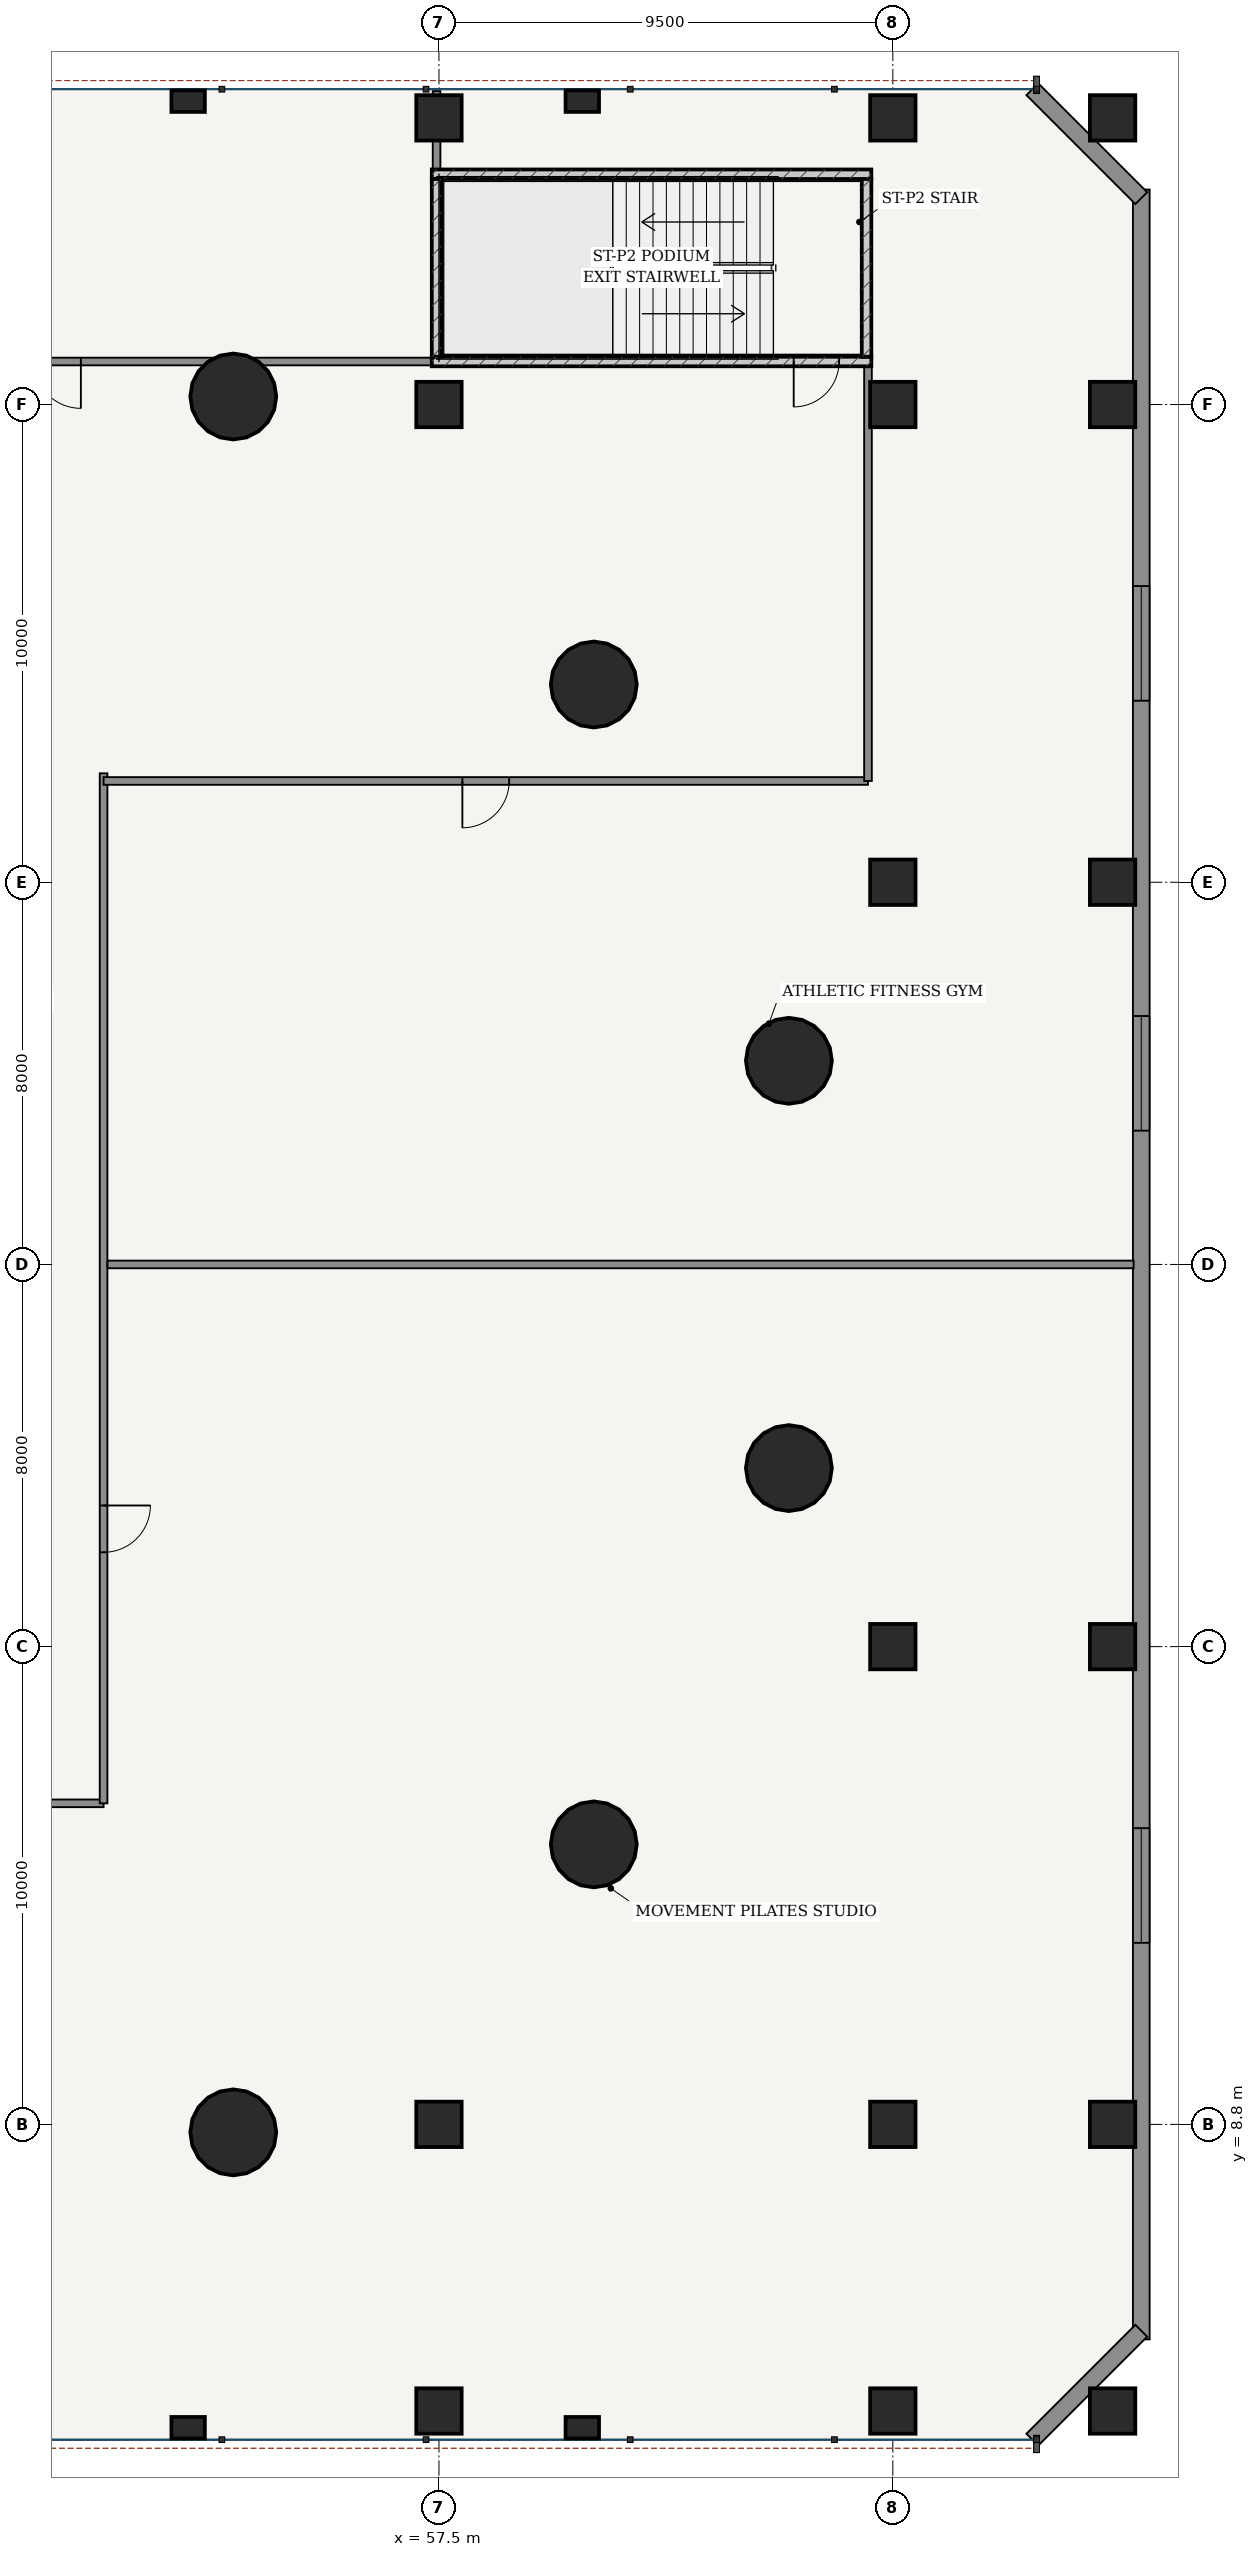
"""IFC4 building model, lengths in metres.
Left out: names, types, materials, properties, quantities, classifications, styles, units other than length and angle.
Written with IfcOpenShell. Run it as: python <this file> out.ifc"""

import sys

from ifc_helpers import new_model, si_unit, direction, frame, frame_2d, origin, origin_2d, place, context, subcontext, project, spatial, rectangle, hollow_circle, extrude, source, transform, mapped, element, fill, save


model = new_model("IFC4")
c1 = context("Model", 3, precision=1e-05, world=origin(), true_north=direction((-0.2419218956, 0.970295726276)))
c2 = subcontext(c1, "Body", "Model", "MODEL_VIEW")
j1 = project(units=[si_unit("LENGTHUNIT", "METRE"), si_unit("PLANEANGLEUNIT", "RADIAN")], contexts=[c1])
p1 = place(None, origin())
s1 = spatial("IfcSite", under=j1, at=p1, CompositionType="ELEMENT")
p2 = place(p1, origin())
s2 = spatial("IfcBuilding", under=s1, at=p2, CompositionType="ELEMENT")
p3 = place(p2, frame((0.0, 0.0, 14.4)))
s3 = spatial("IfcBuildingStorey", under=s2, at=p3, CompositionType="ELEMENT", Elevation=14.4)
p4 = place(p3, frame((57.35, 45.7, 0.0), z_axis=(0.0, 0.0, 1.0), x_axis=(1.0, 0.0, 0.0)))
e1 = element("IfcWall", 1, at=p4, inside=s3, PredefinedType="SOLIDWALL", context=c2, shape_type="SweptSolid", body=[
    extrude(rectangle(XDim=9.2, YDim=0.2, at=frame_2d((4.6, 0.0))), origin(), (0.0, 0.0, 1.0), 4.05),
])
p5 = place(p4, frame((7.575, 0.0, 0.0)))
e2 = element("IfcOpeningElement", 2, at=p5, cuts=e1, PredefinedType="OPENING", context=c2, shape_type="SweptSolid", body=[
    extrude(rectangle(XDim=0.95, YDim=2.15, at=frame_2d((0.475, 1.075))), frame((0.0, 0.11, 0.0), z_axis=(0.0, -1.0, 0.0), x_axis=(1.0, 0.0, 0.0)), (0.0, 0.0, 1.0), 0.22),
])
p6 = place(p3, frame((57.35, 49.62, 0.0), z_axis=(0.0, 0.0, 1.0), x_axis=(1.0, 0.0, 0.0)))
e3 = element("IfcWall", 3, at=p6, inside=s3, PredefinedType="SOLIDWALL", context=c2, shape_type="SweptSolid", body=[
    extrude(rectangle(XDim=9.2, YDim=0.2, at=frame_2d((4.6, 0.0))), origin(), (0.0, 0.0, 1.0), 4.05),
])
for number, where, z_axis, x_axis in (
    (4, (57.45, 45.8, 0.0), (0.0, 0.0, 1.0), (0.0, 1.0, 0.0)),
    (5, (66.45, 45.8, 0.0), (0.0, 0.0, 1.0), (0.0, 1.0, 0.0)),
):
    element("IfcWall", number, at=place(p3, frame(where, z_axis=z_axis, x_axis=x_axis)), inside=s3, PredefinedType="SOLIDWALL", context=c2, shape_type="SweptSolid", body=[
        extrude(rectangle(XDim=3.72, YDim=0.2, at=frame_2d((1.86, 0.0))), origin(), (0.0, 0.0, 1.0), 4.05),
    ])
for number, where, z_axis, x_axis in (
    (6, (64.824, 31.063, 0.0), (0.0, 0.0, 1.0), (1.0, 0.0, 0.0)),
    (7, (60.741, 38.939, 0.0), (0.0, 0.0, 1.0), (1.0, 0.0, 0.0)),
    (8, (53.195, 44.968, 0.0), (0.0, 0.0, 1.0), (1.0, 0.0, 0.0)),
    (9, (53.195, 8.632, 0.0), (0.0, 0.0, 1.0), (1.0, 0.0, 0.0)),
    (10, (60.741, 14.661, 0.0), (0.0, 0.0, 1.0), (1.0, 0.0, 0.0)),
    (11, (64.824, 22.537, 0.0), (0.0, 0.0, 1.0), (1.0, 0.0, 0.0)),
):
    element("IfcColumn", number, at=place(p3, frame(where, z_axis=z_axis, x_axis=x_axis)), inside=s3, PredefinedType="COLUMN", context=c2, shape_type="SweptSolid", body=[
        extrude(hollow_circle(Radius=0.9, WallThickness=0.055, at=origin_2d()), origin(), (0.0, 0.0, 1.0), 4.5),
    ])
for number, where, z_axis, x_axis in (
    (12, (57.5, 2.8, 0.0), (0.0, 0.0, 1.0), (1.0, 0.0, 0.0)),
    (13, (57.5, 8.8, 0.0), (0.0, 0.0, 1.0), (1.0, 0.0, 0.0)),
    (14, (57.5, 44.8, 0.0), (0.0, 0.0, 1.0), (1.0, 0.0, 0.0)),
    (15, (57.5, 50.8, 0.0), (0.0, 0.0, 1.0), (1.0, 0.0, 0.0)),
    (16, (67.0, 2.8, 0.0), (0.0, 0.0, 1.0), (1.0, 0.0, 0.0)),
    (17, (67.0, 8.8, 0.0), (0.0, 0.0, 1.0), (1.0, 0.0, 0.0)),
    (18, (67.0, 18.8, 0.0), (0.0, 0.0, 1.0), (1.0, 0.0, 0.0)),
    (19, (67.0, 34.8, 0.0), (0.0, 0.0, 1.0), (1.0, 0.0, 0.0)),
    (20, (67.0, 44.8, 0.0), (0.0, 0.0, 1.0), (1.0, 0.0, 0.0)),
    (21, (67.0, 50.8, 0.0), (0.0, 0.0, 1.0), (1.0, 0.0, 0.0)),
    (22, (71.6, 2.8, 0.0), (0.0, 0.0, 1.0), (1.0, 0.0, 0.0)),
    (23, (71.6, 8.8, 0.0), (0.0, 0.0, 1.0), (1.0, 0.0, 0.0)),
    (24, (71.6, 18.8, 0.0), (0.0, 0.0, 1.0), (1.0, 0.0, 0.0)),
    (25, (71.6, 34.8, 0.0), (0.0, 0.0, 1.0), (1.0, 0.0, 0.0)),
    (26, (71.6, 44.8, 0.0), (0.0, 0.0, 1.0), (1.0, 0.0, 0.0)),
    (27, (71.6, 50.8, 0.0), (0.0, 0.0, 1.0), (1.0, 0.0, 0.0)),
):
    element("IfcColumn", number, at=place(p3, frame(where, z_axis=z_axis, x_axis=x_axis)), inside=s3, PredefinedType="COLUMN", context=c2, shape_type="SweptSolid", body=[
        extrude(rectangle(XDim=0.95, YDim=0.95, at=origin_2d()), origin(), (0.0, 0.0, 1.0), 4.5),
    ])
for number, where, z_axis, x_axis in (
    (28, (52.25, 2.45, 0.0), (0.0, 0.0, 1.0), (1.0, 0.0, 0.0)),
    (29, (52.25, 51.15, 0.0), (0.0, 0.0, 1.0), (1.0, 0.0, 0.0)),
    (30, (60.5, 2.45, 0.0), (0.0, 0.0, 1.0), (1.0, 0.0, 0.0)),
    (31, (60.5, 51.15, 0.0), (0.0, 0.0, 1.0), (1.0, 0.0, 0.0)),
):
    element("IfcColumn", number, at=place(p3, frame(where, z_axis=z_axis, x_axis=x_axis)), inside=s3, PredefinedType="PILASTER", context=c2, shape_type="SweptSolid", body=[
        extrude(rectangle(XDim=0.7, YDim=0.45, at=origin_2d()), origin(), (0.0, 0.0, 1.0), 4.5),
    ])
p7 = place(p3, frame((72.2, 4.3, 0.0), z_axis=(0.0, 0.0, 1.0), x_axis=(0.0, 1.0, 0.0)))
e32 = element("IfcWall", 32, at=p7, inside=s3, PredefinedType="SOLIDWALL", context=c2, shape_type="SweptSolid", body=[
    extrude(rectangle(XDim=45.0, YDim=0.35, at=frame_2d((22.5, 0.0))), origin(), (0.0, 0.0, 1.0), 4.05),
])
p8 = place(p7, frame((8.3, 0.0, 0.85)))
e33 = element("IfcOpeningElement", 33, at=p8, cuts=e32, PredefinedType="OPENING", context=c2, shape_type="SweptSolid", body=[
    extrude(rectangle(XDim=2.4, YDim=2.2, at=frame_2d((1.2, 1.1))), frame((0.0, 0.185, 0.0), z_axis=(0.0, -1.0, 0.0), x_axis=(1.0, 0.0, 0.0)), (0.0, 0.0, 1.0), 0.37),
])
p9 = place(p7, frame((25.3, 0.0, 0.85)))
e34 = element("IfcOpeningElement", 34, at=p9, cuts=e32, PredefinedType="OPENING", context=c2, shape_type="SweptSolid", body=[
    extrude(rectangle(XDim=2.4, YDim=2.2, at=frame_2d((1.2, 1.1))), frame((0.0, 0.185, 0.0), z_axis=(0.0, -1.0, 0.0), x_axis=(1.0, 0.0, 0.0)), (0.0, 0.0, 1.0), 0.37),
])
p10 = place(p7, frame((34.3, 0.0, 0.85)))
e35 = element("IfcOpeningElement", 35, at=p10, cuts=e32, PredefinedType="OPENING", context=c2, shape_type="SweptSolid", body=[
    extrude(rectangle(XDim=2.4, YDim=2.2, at=frame_2d((1.2, 1.1))), frame((0.0, 0.185, 0.0), z_axis=(0.0, -1.0, 0.0), x_axis=(1.0, 0.0, 0.0)), (0.0, 0.0, 1.0), 0.37),
])
for number, where, z_axis, x_axis in (
    (36, (69.92, 2.2, 0.0), (0.0, 0.0, 1.0), (0.707, 0.707, 0.0)),
    (37, (72.2, 49.12, 0.0), (0.0, 0.0, 1.0), (-0.707, 0.707, 0.0)),
):
    element("IfcWall", number, at=place(p3, frame(where, z_axis=z_axis, x_axis=x_axis)), inside=s3, PredefinedType="SOLIDWALL", context=c2, shape_type="SweptSolid", body=[
        extrude(rectangle(XDim=3.224, YDim=0.35, at=frame_2d((1.612, 0.0))), origin(), (0.0, 0.0, 1.0), 3.085),
    ])
p11 = place(p3, frame((25.52, 15.52, 0.0), z_axis=(0.0, 0.0, 1.0), x_axis=(1.0, 0.0, 0.0)))
e38 = element("IfcWall", 38, at=p11, inside=s3, PredefinedType="PARTITIONING", context=c2, shape_type="SweptSolid", body=[
    extrude(rectangle(XDim=24.96, YDim=0.16, at=frame_2d((12.48, 0.0))), origin(), (0.0, 0.0, 1.0), 3.4),
])
p12 = place(p11, frame((5.854, 0.0, 0.0)))
e39 = element("IfcOpeningElement", 39, at=p12, cuts=e38, PredefinedType="OPENING", context=c2, shape_type="SweptSolid", body=[
    extrude(rectangle(XDim=0.98, YDim=2.2, at=frame_2d((0.49, 1.1))), frame((0.0, 0.09, 0.0), z_axis=(0.0, -1.0, 0.0), x_axis=(1.0, 0.0, 0.0)), (0.0, 0.0, 1.0), 0.18),
])
p13 = place(p11, frame((18.125, 0.0, 0.0)))
e40 = element("IfcOpeningElement", 40, at=p13, cuts=e38, PredefinedType="OPENING", context=c2, shape_type="SweptSolid", body=[
    extrude(rectangle(XDim=0.98, YDim=2.2, at=frame_2d((0.49, 1.1))), frame((0.0, 0.09, 0.0), z_axis=(0.0, -1.0, 0.0), x_axis=(1.0, 0.0, 0.0)), (0.0, 0.0, 1.0), 0.18),
])
p14 = place(p3, frame((50.48, 15.52, 0.0), z_axis=(0.0, 0.0, 1.0), x_axis=(0.0, 1.0, 0.0)))
e41 = element("IfcWall", 41, at=p14, inside=s3, PredefinedType="PARTITIONING", context=c2, shape_type="SweptSolid", body=[
    extrude(rectangle(XDim=21.56, YDim=0.16, at=frame_2d((10.78, 0.0))), origin(), (0.0, 0.0, 1.0), 3.4),
])
p15 = place(p14, frame((5.254, 0.0, 0.0)))
e42 = element("IfcOpeningElement", 42, at=p15, cuts=e41, PredefinedType="OPENING", context=c2, shape_type="SweptSolid", body=[
    extrude(rectangle(XDim=0.98, YDim=2.2, at=frame_2d((0.49, 1.1))), frame((0.0, 0.09, 0.0), z_axis=(0.0, -1.0, 0.0), x_axis=(1.0, 0.0, 0.0)), (0.0, 0.0, 1.0), 0.18),
])
p16 = place(p3, frame((50.48, 36.92, 0.0), z_axis=(0.0, 0.0, 1.0), x_axis=(1.0, 0.0, 0.0)))
e43 = element("IfcWall", 43, at=p16, inside=s3, PredefinedType="PARTITIONING", context=c2, shape_type="SweptSolid", body=[
    extrude(rectangle(XDim=16.0, YDim=0.16, at=frame_2d((8.0, 0.0))), origin(), (0.0, 0.0, 1.0), 3.4),
])
p17 = place(p16, frame((7.51, 0.0, 0.0)))
e44 = element("IfcOpeningElement", 44, at=p17, cuts=e43, PredefinedType="OPENING", context=c2, shape_type="SweptSolid", body=[
    extrude(rectangle(XDim=0.98, YDim=2.2, at=frame_2d((0.49, 1.1))), frame((0.0, 0.09, 0.0), z_axis=(0.0, -1.0, 0.0), x_axis=(1.0, 0.0, 0.0)), (0.0, 0.0, 1.0), 0.18),
])
p18 = place(p3, frame((66.48, 36.92, 0.0), z_axis=(0.0, 0.0, 1.0), x_axis=(0.0, 1.0, 0.0)))
e45 = element("IfcWall", 45, at=p18, inside=s3, PredefinedType="PARTITIONING", context=c2, shape_type="SweptSolid", body=[
    extrude(rectangle(XDim=8.78, YDim=0.16, at=frame_2d((4.39, 0.0))), origin(), (0.0, 0.0, 1.0), 2.435),
])
p19 = place(p3, frame((18.55, 45.7, 0.0), z_axis=(0.0, 0.0, 1.0), x_axis=(1.0, 0.0, 0.0)))
e46 = element("IfcWall", 46, at=p19, inside=s3, PredefinedType="PARTITIONING", context=c2, shape_type="SweptSolid", body=[
    extrude(rectangle(XDim=38.9, YDim=0.16, at=frame_2d((19.45, 0.0))), origin(), (0.0, 0.0, 1.0), 3.4),
])
p20 = place(p19, frame((7.505, 0.0, 0.0)))
e47 = element("IfcOpeningElement", 47, at=p20, cuts=e46, PredefinedType="OPENING", context=c2, shape_type="SweptSolid", body=[
    extrude(rectangle(XDim=0.86, YDim=2.1, at=frame_2d((0.43, 1.05))), frame((0.0, 0.09, 0.0), z_axis=(0.0, -1.0, 0.0), x_axis=(1.0, 0.0, 0.0)), (0.0, 0.0, 1.0), 0.18),
])
p21 = place(p19, frame((19.02, 0.0, 0.0)))
e48 = element("IfcOpeningElement", 48, at=p21, cuts=e46, PredefinedType="OPENING", context=c2, shape_type="SweptSolid", body=[
    extrude(rectangle(XDim=0.86, YDim=2.1, at=frame_2d((0.43, 1.05))), frame((0.0, 0.09, 0.0), z_axis=(0.0, -1.0, 0.0), x_axis=(1.0, 0.0, 0.0)), (0.0, 0.0, 1.0), 0.18),
])
p22 = place(p19, frame((30.475, 0.0, 0.0)))
e49 = element("IfcOpeningElement", 49, at=p22, cuts=e46, PredefinedType="OPENING", context=c2, shape_type="SweptSolid", body=[
    extrude(rectangle(XDim=0.98, YDim=2.2, at=frame_2d((0.49, 1.1))), frame((0.0, 0.09, 0.0), z_axis=(0.0, -1.0, 0.0), x_axis=(1.0, 0.0, 0.0)), (0.0, 0.0, 1.0), 0.18),
])
p23 = place(p3, frame((50.562, 26.8, 0.0), z_axis=(0.0, 0.0, 1.0), x_axis=(1.0, 0.0, 0.0)))
e50 = element("IfcWall", 50, at=p23, inside=s3, PredefinedType="PARTITIONING", context=c2, shape_type="SweptSolid", body=[
    extrude(rectangle(XDim=21.478, YDim=0.16, at=frame_2d((10.739, 0.0))), origin(), (0.0, 0.0, 1.0), 3.492),
])
p24 = place(p3, frame((57.45, 49.722, 0.0), z_axis=(0.0, 0.0, 1.0), x_axis=(0.0, 1.0, 0.0)))
e51 = element("IfcWall", 51, at=p24, inside=s3, PredefinedType="PARTITIONING", context=c2, shape_type="SweptSolid", body=[
    extrude(rectangle(XDim=1.638, YDim=0.16, at=frame_2d((0.819, 0.0))), origin(), (0.0, 0.0, 1.0), 3.085),
])
m1 = source(origin(), c2, "Body", "SweptSolid", [
    extrude(rectangle(XDim=2.4, YDim=2.2, at=frame_2d((1.2, 1.1))), frame((0.0, 0.03, 0.0), z_axis=(0.0, -1.0, 0.0), x_axis=(1.0, 0.0, 0.0)), (0.0, 0.0, 1.0), 0.06),
])
p25 = place(p8, origin())
e52 = element("IfcWindow", 52, at=p25, inside=s3, PartitioningType="SINGLE_PANEL", PredefinedType="WINDOW", context=c2, shape_type="MappedRepresentation", body=[
    mapped(m1, transform((0.0, 0.0, 0.0), scale=1.0)),
])
fill(e33, e52)
p26 = place(p9, origin())
e53 = element("IfcWindow", 53, at=p26, inside=s3, PartitioningType="SINGLE_PANEL", PredefinedType="WINDOW", context=c2, shape_type="MappedRepresentation", body=[
    mapped(m1, transform((0.0, 0.0, 0.0), scale=1.0)),
])
fill(e34, e53)
p27 = place(p10, origin())
e54 = element("IfcWindow", 54, at=p27, inside=s3, PartitioningType="SINGLE_PANEL", PredefinedType="WINDOW", context=c2, shape_type="MappedRepresentation", body=[
    mapped(m1, transform((0.0, 0.0, 0.0), scale=1.0)),
])
fill(e35, e54)
m2 = source(origin(), c2, "Body", "SweptSolid", [
    extrude(rectangle(XDim=0.95, YDim=2.15, at=frame_2d((0.475, 1.075))), frame((0.0, 0.025, 0.0), z_axis=(0.0, -1.0, 0.0), x_axis=(1.0, 0.0, 0.0)), (0.0, 0.0, 1.0), 0.05),
])
p28 = place(p5, frame((0.95, 0.0, 0.0), z_axis=(0.0, 0.0, 1.0), x_axis=(-1.0, 0.0, 0.0)))
e55 = element("IfcDoor", 55, at=p28, inside=s3, OperationType="SINGLE_SWING_RIGHT", PredefinedType="DOOR", context=c2, shape_type="MappedRepresentation", body=[
    mapped(m2, transform((0.0, 0.0, 0.0), scale=1.0)),
])
fill(e2, e55)
m3 = source(origin(), c2, "Body", "SweptSolid", [
    extrude(rectangle(XDim=0.98, YDim=2.2, at=frame_2d((0.49, 1.1))), frame((0.0, 0.025, 0.0), z_axis=(0.0, -1.0, 0.0), x_axis=(1.0, 0.0, 0.0)), (0.0, 0.0, 1.0), 0.05),
])
p29 = place(p15, frame((0.98, 0.0, 0.0), z_axis=(0.0, 0.0, 1.0), x_axis=(-1.0, 0.0, 0.0)))
e56 = element("IfcDoor", 56, at=p29, inside=s3, OperationType="SINGLE_SWING_LEFT", PredefinedType="DOOR", context=c2, shape_type="MappedRepresentation", body=[
    mapped(m3, transform((0.0, 0.0, 0.0), scale=1.0)),
])
fill(e42, e56)
p30 = place(p17, frame((0.98, 0.0, 0.0), z_axis=(0.0, 0.0, 1.0), x_axis=(-1.0, 0.0, 0.0)))
e57 = element("IfcDoor", 57, at=p30, inside=s3, OperationType="SINGLE_SWING_RIGHT", PredefinedType="DOOR", context=c2, shape_type="MappedRepresentation", body=[
    mapped(m3, transform((0.0, 0.0, 0.0), scale=1.0)),
])
fill(e44, e57)
p31 = place(p22, frame((0.98, 0.0, 0.0), z_axis=(0.0, 0.0, 1.0), x_axis=(-1.0, 0.0, 0.0)))
e58 = element("IfcDoor", 58, at=p31, inside=s3, OperationType="SINGLE_SWING_LEFT", PredefinedType="DOOR", context=c2, shape_type="MappedRepresentation", body=[
    mapped(m3, transform((0.0, 0.0, 0.0), scale=1.0)),
])
fill(e49, e58)
save(model, sys.argv[1])
